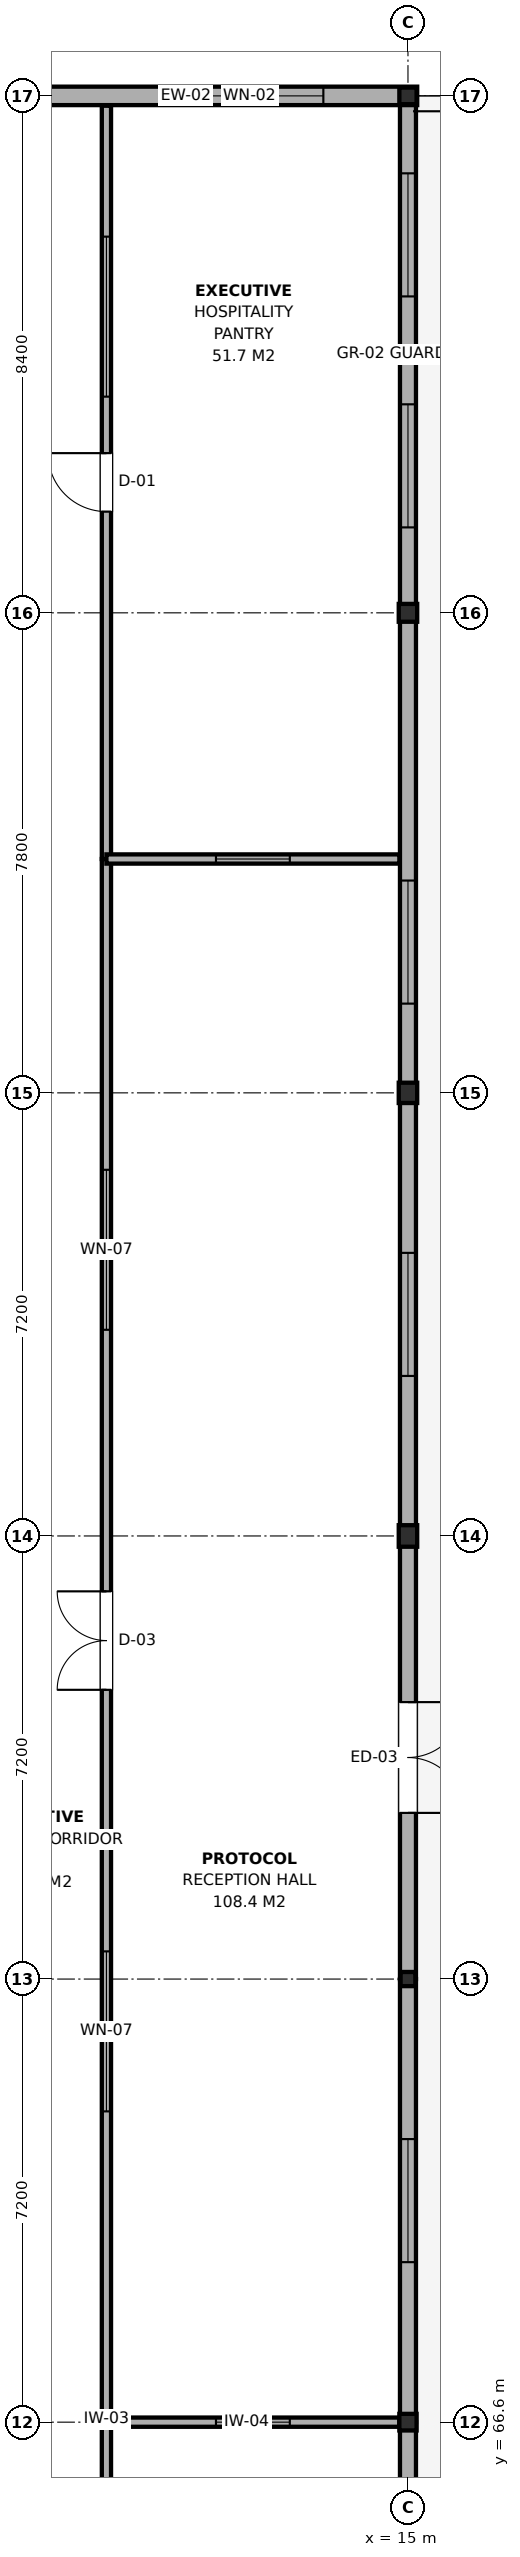
"""IFC4 building model, lengths in metres.
Left out: names, types, materials, properties, quantities, classifications, styles, units other than length and angle.
Written with IfcOpenShell. Run it as: python <this file> out.ifc"""

import sys

from ifc_helpers import new_model, si_unit, direction, frame, frame_2d, origin, origin_2d, place, context, subcontext, project, spatial, rectangle, i_section, extrude, element, fill, save


model = new_model("IFC4")
c1 = context("Model", 3, precision=1e-05, world=origin(), true_north=direction((0.0, 1.0)))
c2 = subcontext(c1, "Body", "Model", "MODEL_VIEW")
j1 = project(units=[si_unit("LENGTHUNIT", "METRE"), si_unit("PLANEANGLEUNIT", "RADIAN")], contexts=[c1])
p1 = place(None, origin())
s1 = spatial("IfcSite", under=j1, at=p1, CompositionType="ELEMENT")
p2 = place(p1, origin())
s2 = spatial("IfcBuilding", under=s1, at=p2, CompositionType="ELEMENT")
p3 = place(p2, frame((0.0, 0.0, 32.7)))
s3 = spatial("IfcBuildingStorey", under=s2, at=p3, CompositionType="ELEMENT", Elevation=32.7)
p4 = place(p3, frame((15.0, 66.6, 0.0), z_axis=(0.0, 0.0, 1.0), x_axis=(1.0, 0.0, 0.0)))
e1 = element("IfcColumn", 1, at=p4, inside=s3, PredefinedType="COLUMN", context=c2, shape_type="SweptSolid", body=[
    extrude(i_section(OverallWidth=0.28, OverallDepth=0.27, WebThickness=0.008, FlangeThickness=0.013, FilletRadius=0.024, at=origin_2d()), origin(), (0.0, 0.0, 1.0), 3.72),
])
p5 = place(p3, frame((15.0, 73.8, 0.0), z_axis=(0.0, 0.0, 1.0), x_axis=(1.0, 0.0, 0.0)))
e2 = element("IfcColumn", 2, at=p5, inside=s3, PredefinedType="COLUMN", context=c2, shape_type="SweptSolid", body=[
    extrude(i_section(OverallWidth=0.24, OverallDepth=0.23, WebThickness=0.008, FlangeThickness=0.012, FilletRadius=0.021, at=origin_2d()), origin(), (0.0, 0.0, 1.0), 3.72),
])
p6 = place(p3, frame((15.0, 81.0, 0.0), z_axis=(0.0, 0.0, 1.0), x_axis=(1.0, 0.0, 0.0)))
e3 = element("IfcColumn", 3, at=p6, inside=s3, PredefinedType="COLUMN", context=c2, shape_type="SweptSolid", body=[
    extrude(i_section(OverallWidth=0.3, OverallDepth=0.35, WebThickness=0.01, FlangeThickness=0.018, FilletRadius=0.027, at=origin_2d()), origin(), (0.0, 0.0, 1.0), 3.72),
])
p7 = place(p3, frame((15.0, 88.2, 0.0), z_axis=(0.0, 0.0, 1.0), x_axis=(1.0, 0.0, 0.0)))
e4 = element("IfcColumn", 4, at=p7, inside=s3, PredefinedType="COLUMN", context=c2, shape_type="SweptSolid", body=[
    extrude(i_section(OverallWidth=0.3, OverallDepth=0.33, WebThickness=0.01, FlangeThickness=0.017, FilletRadius=0.027, at=origin_2d()), origin(), (0.0, 0.0, 1.0), 3.72),
])
p8 = place(p3, frame((15.0, 96.0, 0.0), z_axis=(0.0, 0.0, 1.0), x_axis=(1.0, 0.0, 0.0)))
e5 = element("IfcColumn", 5, at=p8, inside=s3, PredefinedType="COLUMN", context=c2, shape_type="SweptSolid", body=[
    extrude(i_section(OverallWidth=0.3, OverallDepth=0.29, WebThickness=0.009, FlangeThickness=0.014, FilletRadius=0.027, at=origin_2d()), origin(), (0.0, 0.0, 1.0), 3.72),
])
p9 = place(p3, frame((15.0, 104.4, 0.0), z_axis=(0.0, 0.0, 1.0), x_axis=(1.0, 0.0, 0.0)))
e6 = element("IfcColumn", 6, at=p9, inside=s3, PredefinedType="COLUMN", context=c2, shape_type="SweptSolid", body=[
    extrude(i_section(OverallWidth=0.28, OverallDepth=0.27, WebThickness=0.008, FlangeThickness=0.013, FilletRadius=0.024, at=origin_2d()), origin(), (0.0, 0.0, 1.0), 3.72),
])
p10 = place(p3, frame((15.0, 58.8, 0.0), z_axis=(0.0, 0.0, 1.0), x_axis=(0.0, 1.0, 0.0)))
e7 = element("IfcWall", 7, at=p10, inside=s3, PredefinedType="SOLIDWALL", context=c2, shape_type="SweptSolid", body=[
    extrude(rectangle(XDim=7.8, YDim=0.26, at=frame_2d((3.9, 0.0))), origin(), (0.0, 0.0, 1.0), 3.115),
])
p11 = place(p10, frame((2.9, 0.0, 0.9)))
e8 = element("IfcOpeningElement", 8, at=p11, cuts=e7, PredefinedType="OPENING", context=c2, shape_type="SweptSolid", body=[
    extrude(rectangle(XDim=2.0, YDim=1.8, at=frame_2d((1.0, 0.9))), frame((0.0, 0.145, 0.0), z_axis=(0.0, -1.0, 0.0), x_axis=(1.0, 0.0, 0.0)), (0.0, 0.0, 1.0), 0.29),
])
p12 = place(p3, frame((15.0, 66.6, 0.0), z_axis=(0.0, 0.0, 1.0), x_axis=(0.0, 1.0, 0.0)))
e9 = element("IfcWall", 9, at=p12, inside=s3, PredefinedType="SOLIDWALL", context=c2, shape_type="SweptSolid", body=[
    extrude(rectangle(XDim=7.2, YDim=0.26, at=frame_2d((3.6, 0.0))), origin(), (0.0, 0.0, 1.0), 3.165),
])
p13 = place(p12, frame((2.6, 0.0, 0.9)))
e10 = element("IfcOpeningElement", 10, at=p13, cuts=e9, PredefinedType="OPENING", context=c2, shape_type="SweptSolid", body=[
    extrude(rectangle(XDim=2.0, YDim=1.8, at=frame_2d((1.0, 0.9))), frame((0.0, 0.145, 0.0), z_axis=(0.0, -1.0, 0.0), x_axis=(1.0, 0.0, 0.0)), (0.0, 0.0, 1.0), 0.29),
])
p14 = place(p3, frame((15.0, 73.8, 0.0), z_axis=(0.0, 0.0, 1.0), x_axis=(0.0, 1.0, 0.0)))
e11 = element("IfcWall", 11, at=p14, inside=s3, PredefinedType="SOLIDWALL", context=c2, shape_type="SweptSolid", body=[
    extrude(rectangle(XDim=7.2, YDim=0.26, at=frame_2d((3.6, 0.0))), origin(), (0.0, 0.0, 1.0), 3.215),
])
p15 = place(p14, frame((2.7, 0.0, 0.0)))
e12 = element("IfcOpeningElement", 12, at=p15, cuts=e11, PredefinedType="OPENING", context=c2, shape_type="SweptSolid", body=[
    extrude(rectangle(XDim=1.8, YDim=2.2, at=frame_2d((0.9, 1.1))), frame((0.0, 0.145, 0.0), z_axis=(0.0, -1.0, 0.0), x_axis=(1.0, 0.0, 0.0)), (0.0, 0.0, 1.0), 0.29),
])
p16 = place(p3, frame((15.0, 81.0, 0.0), z_axis=(0.0, 0.0, 1.0), x_axis=(0.0, 1.0, 0.0)))
e13 = element("IfcWall", 13, at=p16, inside=s3, PredefinedType="SOLIDWALL", context=c2, shape_type="SweptSolid", body=[
    extrude(rectangle(XDim=7.2, YDim=0.26, at=frame_2d((3.6, 0.0))), origin(), (0.0, 0.0, 1.0), 3.265),
])
p17 = place(p16, frame((2.6, 0.0, 0.9)))
e14 = element("IfcOpeningElement", 14, at=p17, cuts=e13, PredefinedType="OPENING", context=c2, shape_type="SweptSolid", body=[
    extrude(rectangle(XDim=2.0, YDim=1.8, at=frame_2d((1.0, 0.9))), frame((0.0, 0.145, 0.0), z_axis=(0.0, -1.0, 0.0), x_axis=(1.0, 0.0, 0.0)), (0.0, 0.0, 1.0), 0.29),
])
p18 = place(p3, frame((15.0, 88.2, 0.0), z_axis=(0.0, 0.0, 1.0), x_axis=(0.0, 1.0, 0.0)))
e15 = element("IfcWall", 15, at=p18, inside=s3, PredefinedType="SOLIDWALL", context=c2, shape_type="SweptSolid", body=[
    extrude(rectangle(XDim=7.8, YDim=0.26, at=frame_2d((3.9, 0.0))), origin(), (0.0, 0.0, 1.0), 3.225),
])
p19 = place(p18, frame((1.45, 0.0, 0.9)))
e16 = element("IfcOpeningElement", 16, at=p19, cuts=e15, PredefinedType="OPENING", context=c2, shape_type="SweptSolid", body=[
    extrude(rectangle(XDim=2.0, YDim=1.8, at=frame_2d((1.0, 0.9))), frame((0.0, 0.145, 0.0), z_axis=(0.0, -1.0, 0.0), x_axis=(1.0, 0.0, 0.0)), (0.0, 0.0, 1.0), 0.29),
])
p20 = place(p3, frame((15.0, 96.0, 0.0), z_axis=(0.0, 0.0, 1.0), x_axis=(0.0, 1.0, 0.0)))
e17 = element("IfcWall", 17, at=p20, inside=s3, PredefinedType="SOLIDWALL", context=c2, shape_type="SweptSolid", body=[
    extrude(rectangle(XDim=8.53, YDim=0.26, at=frame_2d((4.265, 0.0))), origin(), (0.0, 0.0, 1.0), 3.225),
])
p21 = place(p20, frame((1.388, 0.0, 0.9)))
e18 = element("IfcOpeningElement", 18, at=p21, cuts=e17, PredefinedType="OPENING", context=c2, shape_type="SweptSolid", body=[
    extrude(rectangle(XDim=2.0, YDim=1.8, at=frame_2d((1.0, 0.9))), frame((0.0, 0.145, 0.0), z_axis=(0.0, -1.0, 0.0), x_axis=(1.0, 0.0, 0.0)), (0.0, 0.0, 1.0), 0.29),
])
p22 = place(p20, frame((5.142, 0.0, 0.9)))
e19 = element("IfcOpeningElement", 19, at=p22, cuts=e17, PredefinedType="OPENING", context=c2, shape_type="SweptSolid", body=[
    extrude(rectangle(XDim=2.0, YDim=1.8, at=frame_2d((1.0, 0.9))), frame((0.0, 0.145, 0.0), z_axis=(0.0, -1.0, 0.0), x_axis=(1.0, 0.0, 0.0)), (0.0, 0.0, 1.0), 0.29),
])
p23 = place(p3, frame((7.8, 104.4, 0.0), z_axis=(0.0, 0.0, 1.0), x_axis=(1.0, 0.0, 0.0)))
e20 = element("IfcWall", 20, at=p23, inside=s3, PredefinedType="SOLIDWALL", context=c2, shape_type="SweptSolid", body=[
    extrude(rectangle(XDim=7.35, YDim=0.3, at=frame_2d((3.675, 0.0))), origin(), (0.0, 0.0, 1.0), 3.215),
])
p24 = place(p23, frame((3.425, 0.0, 0.9)))
e21 = element("IfcOpeningElement", 21, at=p24, cuts=e20, PredefinedType="OPENING", context=c2, shape_type="SweptSolid", body=[
    extrude(rectangle(XDim=2.4, YDim=2.1, at=frame_2d((1.2, 1.05))), frame((0.0, 0.165, 0.0), z_axis=(0.0, -1.0, 0.0), x_axis=(1.0, 0.0, 0.0)), (0.0, 0.0, 1.0), 0.33),
])
p25 = place(p3, frame((10.1, 42.0, 0.0), z_axis=(0.0, 0.0, 1.0), x_axis=(0.0, 1.0, 0.0)))
e22 = element("IfcWall", 22, at=p25, inside=s3, PredefinedType="PARTITIONING", context=c2, shape_type="SweptSolid", body=[
    extrude(rectangle(XDim=24.6, YDim=0.15, at=frame_2d((12.3, 0.0))), origin(), (0.0, 0.0, 1.0), 3.165),
])
p26 = place(p25, frame((11.775, 0.0, 0.0)))
e23 = element("IfcOpeningElement", 23, at=p26, cuts=e22, PredefinedType="OPENING", context=c2, shape_type="SweptSolid", body=[
    extrude(rectangle(XDim=1.05, YDim=2.15, at=frame_2d((0.525, 1.075))), frame((0.0, 0.09, 0.0), z_axis=(0.0, -1.0, 0.0), x_axis=(1.0, 0.0, 0.0)), (0.0, 0.0, 1.0), 0.18),
])
p27 = place(p25, frame((4.85, 0.0, 0.95)))
e24 = element("IfcOpeningElement", 24, at=p27, cuts=e22, PredefinedType="OPENING", context=c2, shape_type="SweptSolid", body=[
    extrude(rectangle(XDim=2.6, YDim=1.5, at=frame_2d((1.3, 0.75))), frame((0.0, 0.09, 0.0), z_axis=(0.0, -1.0, 0.0), x_axis=(1.0, 0.0, 0.0)), (0.0, 0.0, 1.0), 0.18),
])
p28 = place(p25, frame((17.15, 0.0, 0.95)))
e25 = element("IfcOpeningElement", 25, at=p28, cuts=e22, PredefinedType="OPENING", context=c2, shape_type="SweptSolid", body=[
    extrude(rectangle(XDim=2.6, YDim=1.5, at=frame_2d((1.3, 0.75))), frame((0.0, 0.09, 0.0), z_axis=(0.0, -1.0, 0.0), x_axis=(1.0, 0.0, 0.0)), (0.0, 0.0, 1.0), 0.18),
])
p29 = place(p3, frame((10.1, 66.6, 0.0), z_axis=(0.0, 0.0, 1.0), x_axis=(0.0, 1.0, 0.0)))
e26 = element("IfcWall", 26, at=p29, inside=s3, PredefinedType="PARTITIONING", context=c2, shape_type="SweptSolid", body=[
    extrude(rectangle(XDim=25.4, YDim=0.15, at=frame_2d((12.7, 0.0))), origin(), (0.0, 0.0, 1.0), 3.165),
])
p30 = place(p29, frame((11.9, 0.0, 0.0)))
e27 = element("IfcOpeningElement", 27, at=p30, cuts=e26, PredefinedType="OPENING", context=c2, shape_type="SweptSolid", body=[
    extrude(rectangle(XDim=1.6, YDim=2.15, at=frame_2d((0.8, 1.075))), frame((0.0, 0.09, 0.0), z_axis=(0.0, -1.0, 0.0), x_axis=(1.0, 0.0, 0.0)), (0.0, 0.0, 1.0), 0.18),
])
p31 = place(p29, frame((5.05, 0.0, 0.95)))
e28 = element("IfcOpeningElement", 28, at=p31, cuts=e26, PredefinedType="OPENING", context=c2, shape_type="SweptSolid", body=[
    extrude(rectangle(XDim=2.6, YDim=1.5, at=frame_2d((1.3, 0.75))), frame((0.0, 0.09, 0.0), z_axis=(0.0, -1.0, 0.0), x_axis=(1.0, 0.0, 0.0)), (0.0, 0.0, 1.0), 0.18),
])
p32 = place(p29, frame((17.75, 0.0, 0.95)))
e29 = element("IfcOpeningElement", 29, at=p32, cuts=e26, PredefinedType="OPENING", context=c2, shape_type="SweptSolid", body=[
    extrude(rectangle(XDim=2.6, YDim=1.5, at=frame_2d((1.3, 0.75))), frame((0.0, 0.09, 0.0), z_axis=(0.0, -1.0, 0.0), x_axis=(1.0, 0.0, 0.0)), (0.0, 0.0, 1.0), 0.18),
])
p33 = place(p3, frame((10.1, 66.6, 0.0), z_axis=(0.0, 0.0, 1.0), x_axis=(1.0, 0.0, 0.0)))
e30 = element("IfcWall", 30, at=p33, inside=s3, PredefinedType="PARTITIONING", context=c2, shape_type="SweptSolid", body=[
    extrude(rectangle(XDim=4.76, YDim=0.15, at=frame_2d((2.38, 0.0))), origin(), (0.0, 0.0, 1.0), 3.165),
])
p34 = place(p33, frame((1.78, 0.0, 0.95)))
e31 = element("IfcOpeningElement", 31, at=p34, cuts=e30, PredefinedType="OPENING", context=c2, shape_type="SweptSolid", body=[
    extrude(rectangle(XDim=1.2, YDim=1.5, at=frame_2d((0.6, 0.75))), frame((0.0, 0.09, 0.0), z_axis=(0.0, -1.0, 0.0), x_axis=(1.0, 0.0, 0.0)), (0.0, 0.0, 1.0), 0.18),
])
p35 = place(p3, frame((10.1, 92.0, 0.0), z_axis=(0.0, 0.0, 1.0), x_axis=(0.0, 1.0, 0.0)))
e32 = element("IfcWall", 32, at=p35, inside=s3, PredefinedType="PARTITIONING", context=c2, shape_type="SweptSolid", body=[
    extrude(rectangle(XDim=12.24, YDim=0.15, at=frame_2d((6.12, 0.0))), origin(), (0.0, 0.0, 1.0), 3.165),
])
p36 = place(p35, frame((5.645, 0.0, 0.0)))
e33 = element("IfcOpeningElement", 33, at=p36, cuts=e32, PredefinedType="OPENING", context=c2, shape_type="SweptSolid", body=[
    extrude(rectangle(XDim=0.95, YDim=2.15, at=frame_2d((0.475, 1.075))), frame((0.0, 0.09, 0.0), z_axis=(0.0, -1.0, 0.0), x_axis=(1.0, 0.0, 0.0)), (0.0, 0.0, 1.0), 0.18),
])
p37 = place(p35, frame((7.513, 0.0, 0.95)))
e34 = element("IfcOpeningElement", 34, at=p37, cuts=e32, PredefinedType="OPENING", context=c2, shape_type="SweptSolid", body=[
    extrude(rectangle(XDim=2.6, YDim=1.5, at=frame_2d((1.3, 0.75))), frame((0.0, 0.09, 0.0), z_axis=(0.0, -1.0, 0.0), x_axis=(1.0, 0.0, 0.0)), (0.0, 0.0, 1.0), 0.18),
])
p38 = place(p3, frame((10.1, 92.0, 0.0), z_axis=(0.0, 0.0, 1.0), x_axis=(1.0, 0.0, 0.0)))
e35 = element("IfcWall", 35, at=p38, inside=s3, PredefinedType="PARTITIONING", context=c2, shape_type="SweptSolid", body=[
    extrude(rectangle(XDim=4.76, YDim=0.15, at=frame_2d((2.38, 0.0))), origin(), (0.0, 0.0, 1.0), 3.385),
])
p39 = place(p38, frame((1.78, 0.0, 0.95)))
e36 = element("IfcOpeningElement", 36, at=p39, cuts=e35, PredefinedType="OPENING", context=c2, shape_type="SweptSolid", body=[
    extrude(rectangle(XDim=1.2, YDim=1.5, at=frame_2d((0.6, 0.75))), frame((0.0, 0.09, 0.0), z_axis=(0.0, -1.0, 0.0), x_axis=(1.0, 0.0, 0.0)), (0.0, 0.0, 1.0), 0.18),
])
p40 = place(p13, origin())
e37 = element("IfcWindow", 37, at=p40, inside=s3, PartitioningType="SINGLE_PANEL", PredefinedType="WINDOW", context=c2, shape_type="SweptSolid", body=[
    extrude(rectangle(XDim=2.0, YDim=1.8, at=frame_2d((1.0, 0.9))), frame((0.0, 0.03, 0.0), z_axis=(0.0, -1.0, 0.0), x_axis=(1.0, 0.0, 0.0)), (0.0, 0.0, 1.0), 0.06),
])
fill(e10, e37)
p41 = place(p15, frame((1.8, 0.0, 0.0), z_axis=(0.0, 0.0, 1.0), x_axis=(-1.0, 0.0, 0.0)))
e38 = element("IfcDoor", 38, at=p41, inside=s3, OperationType="DOUBLE_DOOR_SINGLE_SWING", PredefinedType="DOOR", context=c2, shape_type="SweptSolid", body=[
    extrude(rectangle(XDim=1.8, YDim=2.2, at=frame_2d((0.9, 1.1))), frame((0.0, 0.025, 0.0), z_axis=(0.0, -1.0, 0.0), x_axis=(1.0, 0.0, 0.0)), (0.0, 0.0, 1.0), 0.05),
])
fill(e12, e38)
p42 = place(p17, origin())
e39 = element("IfcWindow", 39, at=p42, inside=s3, PartitioningType="SINGLE_PANEL", PredefinedType="WINDOW", context=c2, shape_type="SweptSolid", body=[
    extrude(rectangle(XDim=2.0, YDim=1.8, at=frame_2d((1.0, 0.9))), frame((0.0, 0.03, 0.0), z_axis=(0.0, -1.0, 0.0), x_axis=(1.0, 0.0, 0.0)), (0.0, 0.0, 1.0), 0.06),
])
fill(e14, e39)
p43 = place(p19, origin())
e40 = element("IfcWindow", 40, at=p43, inside=s3, PartitioningType="SINGLE_PANEL", PredefinedType="WINDOW", context=c2, shape_type="SweptSolid", body=[
    extrude(rectangle(XDim=2.0, YDim=1.8, at=frame_2d((1.0, 0.9))), frame((0.0, 0.03, 0.0), z_axis=(0.0, -1.0, 0.0), x_axis=(1.0, 0.0, 0.0)), (0.0, 0.0, 1.0), 0.06),
])
fill(e16, e40)
p44 = place(p21, origin())
e41 = element("IfcWindow", 41, at=p44, inside=s3, PartitioningType="SINGLE_PANEL", PredefinedType="WINDOW", context=c2, shape_type="SweptSolid", body=[
    extrude(rectangle(XDim=2.0, YDim=1.8, at=frame_2d((1.0, 0.9))), frame((0.0, 0.03, 0.0), z_axis=(0.0, -1.0, 0.0), x_axis=(1.0, 0.0, 0.0)), (0.0, 0.0, 1.0), 0.06),
])
fill(e18, e41)
p45 = place(p22, origin())
e42 = element("IfcWindow", 42, at=p45, inside=s3, PartitioningType="SINGLE_PANEL", PredefinedType="WINDOW", context=c2, shape_type="SweptSolid", body=[
    extrude(rectangle(XDim=2.0, YDim=1.8, at=frame_2d((1.0, 0.9))), frame((0.0, 0.03, 0.0), z_axis=(0.0, -1.0, 0.0), x_axis=(1.0, 0.0, 0.0)), (0.0, 0.0, 1.0), 0.06),
])
fill(e19, e42)
p46 = place(p24, origin())
e43 = element("IfcWindow", 43, at=p46, inside=s3, PartitioningType="SINGLE_PANEL", PredefinedType="WINDOW", context=c2, shape_type="SweptSolid", body=[
    extrude(rectangle(XDim=2.4, YDim=2.1, at=frame_2d((1.2, 1.05))), frame((0.0, 0.03, 0.0), z_axis=(0.0, -1.0, 0.0), x_axis=(1.0, 0.0, 0.0)), (0.0, 0.0, 1.0), 0.06),
])
fill(e21, e43)
p47 = place(p30, origin())
e44 = element("IfcDoor", 44, at=p47, inside=s3, OperationType="DOUBLE_DOOR_SINGLE_SWING", PredefinedType="DOOR", context=c2, shape_type="SweptSolid", body=[
    extrude(rectangle(XDim=1.6, YDim=2.15, at=frame_2d((0.8, 1.075))), frame((0.0, 0.025, 0.0), z_axis=(0.0, -1.0, 0.0), x_axis=(1.0, 0.0, 0.0)), (0.0, 0.0, 1.0), 0.05),
])
fill(e27, e44)
p48 = place(p31, origin())
e45 = element("IfcWindow", 45, at=p48, inside=s3, PartitioningType="SINGLE_PANEL", PredefinedType="WINDOW", context=c2, shape_type="SweptSolid", body=[
    extrude(rectangle(XDim=2.6, YDim=1.5, at=frame_2d((1.3, 0.75))), frame((0.0, 0.03, 0.0), z_axis=(0.0, -1.0, 0.0), x_axis=(1.0, 0.0, 0.0)), (0.0, 0.0, 1.0), 0.06),
])
fill(e28, e45)
p49 = place(p32, origin())
e46 = element("IfcWindow", 46, at=p49, inside=s3, PartitioningType="SINGLE_PANEL", PredefinedType="WINDOW", context=c2, shape_type="SweptSolid", body=[
    extrude(rectangle(XDim=2.6, YDim=1.5, at=frame_2d((1.3, 0.75))), frame((0.0, 0.03, 0.0), z_axis=(0.0, -1.0, 0.0), x_axis=(1.0, 0.0, 0.0)), (0.0, 0.0, 1.0), 0.06),
])
fill(e29, e46)
p50 = place(p34, origin())
e47 = element("IfcWindow", 47, at=p50, inside=s3, PartitioningType="SINGLE_PANEL", PredefinedType="WINDOW", context=c2, shape_type="SweptSolid", body=[
    extrude(rectangle(XDim=1.2, YDim=1.5, at=frame_2d((0.6, 0.75))), frame((0.0, 0.03, 0.0), z_axis=(0.0, -1.0, 0.0), x_axis=(1.0, 0.0, 0.0)), (0.0, 0.0, 1.0), 0.06),
])
fill(e31, e47)
p51 = place(p36, origin())
e48 = element("IfcDoor", 48, at=p51, inside=s3, OperationType="SINGLE_SWING_RIGHT", PredefinedType="DOOR", context=c2, shape_type="SweptSolid", body=[
    extrude(rectangle(XDim=0.95, YDim=2.15, at=frame_2d((0.475, 1.075))), frame((0.0, 0.025, 0.0), z_axis=(0.0, -1.0, 0.0), x_axis=(1.0, 0.0, 0.0)), (0.0, 0.0, 1.0), 0.05),
])
fill(e33, e48)
p52 = place(p37, origin())
e49 = element("IfcWindow", 49, at=p52, inside=s3, PartitioningType="SINGLE_PANEL", PredefinedType="WINDOW", context=c2, shape_type="SweptSolid", body=[
    extrude(rectangle(XDim=2.6, YDim=1.5, at=frame_2d((1.3, 0.75))), frame((0.0, 0.03, 0.0), z_axis=(0.0, -1.0, 0.0), x_axis=(1.0, 0.0, 0.0)), (0.0, 0.0, 1.0), 0.06),
])
fill(e34, e49)
p53 = place(p39, origin())
e50 = element("IfcWindow", 50, at=p53, inside=s3, PartitioningType="SINGLE_PANEL", PredefinedType="WINDOW", context=c2, shape_type="SweptSolid", body=[
    extrude(rectangle(XDim=1.2, YDim=1.5, at=frame_2d((0.6, 0.75))), frame((0.0, 0.03, 0.0), z_axis=(0.0, -1.0, 0.0), x_axis=(1.0, 0.0, 0.0)), (0.0, 0.0, 1.0), 0.06),
])
fill(e36, e50)
save(model, sys.argv[1])
